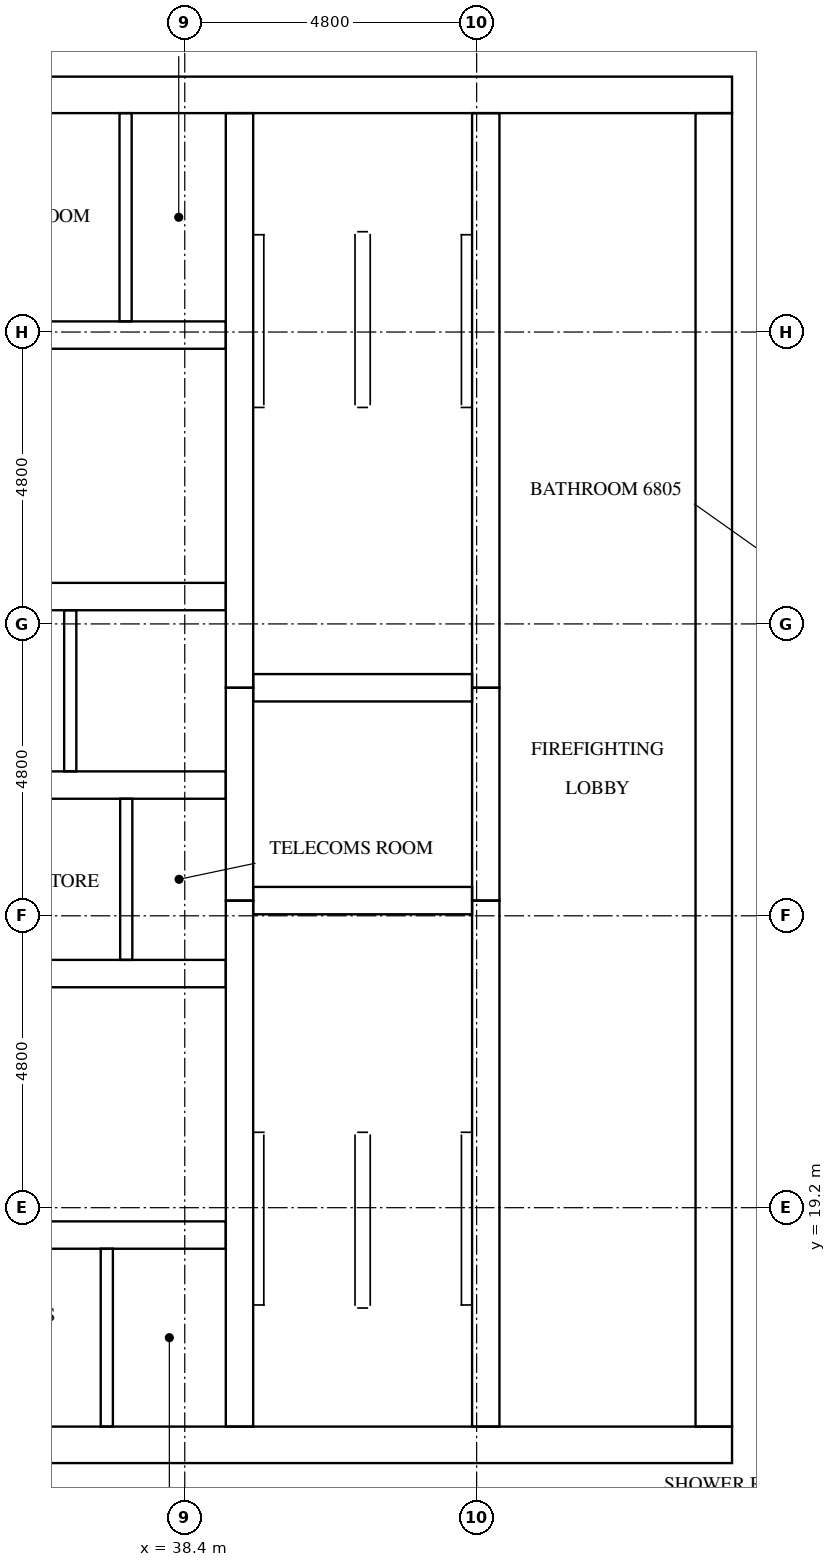
"""IFC4 building model, lengths in metres.
Left out: names, types, materials, properties, quantities, classifications, styles, units other than length and angle.
Written with IfcOpenShell. Run it as: python <this file> out.ifc"""

import sys

from ifc_helpers import new_model, si_unit, direction, frame, frame_2d, origin, place, context, subcontext, project, spatial, rectangle, extrude, element, fill, save


model = new_model("IFC4")
c1 = context("Model", 3, precision=1e-05, world=origin(), true_north=direction((0.0, 1.0)))
c2 = subcontext(c1, "Body", "Model", "MODEL_VIEW")
j1 = project(units=[si_unit("LENGTHUNIT", "METRE"), si_unit("PLANEANGLEUNIT", "RADIAN")], contexts=[c1])
p1 = place(None, origin())
s1 = spatial("IfcSite", under=j1, at=p1, CompositionType="ELEMENT")
p2 = place(p1, origin())
s2 = spatial("IfcBuilding", under=s1, at=p2, CompositionType="ELEMENT")
p3 = place(p2, frame((0.0, 0.0, 259.7)))
s3 = spatial("IfcBuildingStorey", under=s2, at=p3, CompositionType="ELEMENT", Elevation=259.7)
p4 = place(p3, frame((15.0, 15.3, 0.0), z_axis=(0.0, 0.0, 1.0), x_axis=(1.0, 0.0, 0.0)))
e1 = element("IfcWall", 1, at=p4, inside=s3, PredefinedType="SHEAR", context=c2, shape_type="SweptSolid", body=[
    extrude(rectangle(XDim=32.4, YDim=0.6, at=frame_2d((16.2, 0.0))), origin(), (0.0, 0.0, 1.0), 3.1),
])
p5 = place(p4, frame((15.3, 0.0, 0.0)))
e2 = element("IfcOpeningElement", 2, at=p5, cuts=e1, PredefinedType="OPENING", context=c2, shape_type="SweptSolid", body=[
    extrude(rectangle(XDim=1.8, YDim=2.1, at=frame_2d((0.9, 1.05))), frame((0.0, 0.31, 0.0), z_axis=(0.0, -1.0, 0.0), x_axis=(1.0, 0.0, 0.0)), (0.0, 0.0, 1.0), 0.62),
])
p6 = place(p3, frame((15.0, 37.5, 0.0), z_axis=(0.0, 0.0, 1.0), x_axis=(1.0, 0.0, 0.0)))
e3 = element("IfcWall", 3, at=p6, inside=s3, PredefinedType="SHEAR", context=c2, shape_type="SweptSolid", body=[
    extrude(rectangle(XDim=32.4, YDim=0.6, at=frame_2d((16.2, 0.0))), origin(), (0.0, 0.0, 1.0), 3.1),
])
p7 = place(p6, frame((15.3, 0.0, 0.0)))
e4 = element("IfcOpeningElement", 4, at=p7, cuts=e3, PredefinedType="OPENING", context=c2, shape_type="SweptSolid", body=[
    extrude(rectangle(XDim=1.8, YDim=2.1, at=frame_2d((0.9, 1.05))), frame((0.0, 0.31, 0.0), z_axis=(0.0, -1.0, 0.0), x_axis=(1.0, 0.0, 0.0)), (0.0, 0.0, 1.0), 0.62),
])
p8 = place(p6, frame((1.25, 0.0, 0.0)))
e5 = element("IfcOpeningElement", 5, at=p8, cuts=e3, PredefinedType="OPENING", context=c2, shape_type="SweptSolid", body=[
    extrude(rectangle(XDim=1.0, YDim=2.1, at=frame_2d((0.5, 1.05))), frame((0.0, 0.31, 0.0), z_axis=(0.0, -1.0, 0.0), x_axis=(1.0, 0.0, 0.0)), (0.0, 0.0, 1.0), 0.62),
])
p9 = place(p6, frame((4.988, 0.0, 0.0)))
e6 = element("IfcOpeningElement", 6, at=p9, cuts=e3, PredefinedType="OPENING", context=c2, shape_type="SweptSolid", body=[
    extrude(rectangle(XDim=1.0, YDim=2.1, at=frame_2d((0.5, 1.05))), frame((0.0, 0.31, 0.0), z_axis=(0.0, -1.0, 0.0), x_axis=(1.0, 0.0, 0.0)), (0.0, 0.0, 1.0), 0.62),
])
p10 = place(p3, frame((47.1, 15.6, 0.0), z_axis=(0.0, 0.0, 1.0), x_axis=(0.0, 1.0, 0.0)))
e7 = element("IfcWall", 7, at=p10, inside=s3, PredefinedType="SHEAR", context=c2, shape_type="SweptSolid", body=[
    extrude(rectangle(XDim=21.6, YDim=0.6, at=frame_2d((10.8, 0.0))), origin(), (0.0, 0.0, 1.0), 3.1),
])
p11 = place(p10, frame((10.5, 0.0, 0.0)))
e8 = element("IfcOpeningElement", 8, at=p11, cuts=e7, PredefinedType="OPENING", context=c2, shape_type="SweptSolid", body=[
    extrude(rectangle(XDim=1.2, YDim=2.1, at=frame_2d((0.6, 1.05))), frame((0.0, 0.31, 0.0), z_axis=(0.0, -1.0, 0.0), x_axis=(1.0, 0.0, 0.0)), (0.0, 0.0, 1.0), 0.62),
])
p12 = place(p3, frame((39.3, 15.6, 0.0), z_axis=(0.0, 0.0, 1.0), x_axis=(0.0, 1.0, 0.0)))
e9 = element("IfcWall", 9, at=p12, inside=s3, PredefinedType="SHEAR", context=c2, shape_type="SweptSolid", body=[
    extrude(rectangle(XDim=8.65, YDim=0.45, at=frame_2d((4.325, 0.0))), origin(), (0.0, 0.0, 1.0), 3.1),
])
p13 = place(p3, frame((39.3, 24.25, 0.0), z_axis=(0.0, 0.0, 1.0), x_axis=(0.0, 1.0, 0.0)))
e10 = element("IfcWall", 10, at=p13, inside=s3, PredefinedType="SHEAR", context=c2, shape_type="SweptSolid", body=[
    extrude(rectangle(XDim=3.5, YDim=0.45, at=frame_2d((1.75, 0.0))), origin(), (0.0, 0.0, 1.0), 3.1),
])
p14 = place(p3, frame((39.3, 27.75, 0.0), z_axis=(0.0, 0.0, 1.0), x_axis=(0.0, 1.0, 0.0)))
e11 = element("IfcWall", 11, at=p14, inside=s3, PredefinedType="SHEAR", context=c2, shape_type="SweptSolid", body=[
    extrude(rectangle(XDim=9.45, YDim=0.45, at=frame_2d((4.725, 0.0))), origin(), (0.0, 0.0, 1.0), 3.1),
])
p15 = place(p3, frame((43.35, 15.6, 0.0), z_axis=(0.0, 0.0, 1.0), x_axis=(0.0, 1.0, 0.0)))
e12 = element("IfcWall", 12, at=p15, inside=s3, PredefinedType="SHEAR", context=c2, shape_type="SweptSolid", body=[
    extrude(rectangle(XDim=8.65, YDim=0.45, at=frame_2d((4.325, 0.0))), origin(), (0.0, 0.0, 1.0), 3.1),
])
p16 = place(p15, frame((0.6, 0.0, 0.0)))
e13 = element("IfcOpeningElement", 13, at=p16, cuts=e12, PredefinedType="OPENING", context=c2, shape_type="SweptSolid", body=[
    extrude(rectangle(XDim=1.2, YDim=2.1, at=frame_2d((0.6, 1.05))), frame((0.0, 0.235, 0.0), z_axis=(0.0, -1.0, 0.0), x_axis=(1.0, 0.0, 0.0)), (0.0, 0.0, 1.0), 0.47),
])
p17 = place(p3, frame((43.35, 24.25, 0.0), z_axis=(0.0, 0.0, 1.0), x_axis=(0.0, 1.0, 0.0)))
e14 = element("IfcWall", 14, at=p17, inside=s3, PredefinedType="SHEAR", context=c2, shape_type="SweptSolid", body=[
    extrude(rectangle(XDim=3.5, YDim=0.45, at=frame_2d((1.75, 0.0))), origin(), (0.0, 0.0, 1.0), 3.1),
])
p18 = place(p17, frame((1.2, 0.0, 0.0)))
e15 = element("IfcOpeningElement", 15, at=p18, cuts=e14, PredefinedType="OPENING", context=c2, shape_type="SweptSolid", body=[
    extrude(rectangle(XDim=1.1, YDim=2.1, at=frame_2d((0.55, 1.05))), frame((0.0, 0.235, 0.0), z_axis=(0.0, -1.0, 0.0), x_axis=(1.0, 0.0, 0.0)), (0.0, 0.0, 1.0), 0.47),
])
p19 = place(p3, frame((43.35, 27.75, 0.0), z_axis=(0.0, 0.0, 1.0), x_axis=(0.0, 1.0, 0.0)))
e16 = element("IfcWall", 16, at=p19, inside=s3, PredefinedType="SHEAR", context=c2, shape_type="SweptSolid", body=[
    extrude(rectangle(XDim=9.45, YDim=0.45, at=frame_2d((4.725, 0.0))), origin(), (0.0, 0.0, 1.0), 3.1),
])
p20 = place(p19, frame((7.65, 0.0, 0.0)))
e17 = element("IfcOpeningElement", 17, at=p20, cuts=e16, PredefinedType="OPENING", context=c2, shape_type="SweptSolid", body=[
    extrude(rectangle(XDim=1.2, YDim=2.1, at=frame_2d((0.6, 1.05))), frame((0.0, 0.235, 0.0), z_axis=(0.0, -1.0, 0.0), x_axis=(1.0, 0.0, 0.0)), (0.0, 0.0, 1.0), 0.47),
])
for number, where, z_axis, x_axis in (
    (18, (39.525, 24.25, 0.0), (0.0, 0.0, 1.0), (1.0, 0.0, 0.0)),
    (19, (39.525, 27.75, 0.0), (0.0, 0.0, 1.0), (1.0, 0.0, 0.0)),
):
    element("IfcWall", number, at=place(p3, frame(where, z_axis=z_axis, x_axis=x_axis)), inside=s3, PredefinedType="SHEAR", context=c2, shape_type="SweptSolid", body=[
        extrude(rectangle(XDim=3.6, YDim=0.45, at=frame_2d((1.8, 0.0))), origin(), (0.0, 0.0, 1.0), 3.1),
    ])
p21 = place(p3, frame((33.475, 18.75, 0.0), z_axis=(0.0, 0.0, 1.0), x_axis=(1.0, 0.0, 0.0)))
e20 = element("IfcWall", 20, at=p21, inside=s3, PredefinedType="SHEAR", context=c2, shape_type="SweptSolid", body=[
    extrude(rectangle(XDim=5.6, YDim=0.45, at=frame_2d((2.8, 0.0))), origin(), (0.0, 0.0, 1.0), 3.1),
])
p22 = place(p21, frame((1.497, 0.0, 0.0)))
e21 = element("IfcOpeningElement", 21, at=p22, cuts=e20, PredefinedType="OPENING", context=c2, shape_type="SweptSolid", body=[
    extrude(rectangle(XDim=1.0, YDim=2.1, at=frame_2d((0.5, 1.05))), frame((0.0, 0.235, 0.0), z_axis=(0.0, -1.0, 0.0), x_axis=(1.0, 0.0, 0.0)), (0.0, 0.0, 1.0), 0.47),
])
p23 = place(p21, frame((4.171, 0.0, 0.0)))
e22 = element("IfcOpeningElement", 22, at=p23, cuts=e20, PredefinedType="OPENING", context=c2, shape_type="SweptSolid", body=[
    extrude(rectangle(XDim=1.0, YDim=2.1, at=frame_2d((0.5, 1.05))), frame((0.0, 0.235, 0.0), z_axis=(0.0, -1.0, 0.0), x_axis=(1.0, 0.0, 0.0)), (0.0, 0.0, 1.0), 0.47),
])
p24 = place(p3, frame((23.325, 23.05, 0.0), z_axis=(0.0, 0.0, 1.0), x_axis=(1.0, 0.0, 0.0)))
e23 = element("IfcWall", 23, at=p24, inside=s3, PredefinedType="SHEAR", context=c2, shape_type="SweptSolid", body=[
    extrude(rectangle(XDim=15.75, YDim=0.45, at=frame_2d((7.875, 0.0))), origin(), (0.0, 0.0, 1.0), 3.1),
])
p25 = place(p24, frame((2.058, 0.0, 0.0)))
e24 = element("IfcOpeningElement", 24, at=p25, cuts=e23, PredefinedType="OPENING", context=c2, shape_type="SweptSolid", body=[
    extrude(rectangle(XDim=1.0, YDim=2.1, at=frame_2d((0.5, 1.05))), frame((0.0, 0.235, 0.0), z_axis=(0.0, -1.0, 0.0), x_axis=(1.0, 0.0, 0.0)), (0.0, 0.0, 1.0), 0.47),
])
p26 = place(p24, frame((11.823, 0.0, 0.0)))
e25 = element("IfcOpeningElement", 25, at=p26, cuts=e23, PredefinedType="OPENING", context=c2, shape_type="SweptSolid", body=[
    extrude(rectangle(XDim=1.0, YDim=2.1, at=frame_2d((0.5, 1.05))), frame((0.0, 0.235, 0.0), z_axis=(0.0, -1.0, 0.0), x_axis=(1.0, 0.0, 0.0)), (0.0, 0.0, 1.0), 0.47),
])
p27 = place(p24, frame((14.481, 0.0, 0.0)))
e26 = element("IfcOpeningElement", 26, at=p27, cuts=e23, PredefinedType="OPENING", context=c2, shape_type="SweptSolid", body=[
    extrude(rectangle(XDim=1.0, YDim=2.1, at=frame_2d((0.5, 1.05))), frame((0.0, 0.235, 0.0), z_axis=(0.0, -1.0, 0.0), x_axis=(1.0, 0.0, 0.0)), (0.0, 0.0, 1.0), 0.47),
])
p28 = place(p3, frame((23.325, 26.15, 0.0), z_axis=(0.0, 0.0, 1.0), x_axis=(1.0, 0.0, 0.0)))
e27 = element("IfcWall", 27, at=p28, inside=s3, PredefinedType="SHEAR", context=c2, shape_type="SweptSolid", body=[
    extrude(rectangle(XDim=15.75, YDim=0.45, at=frame_2d((7.875, 0.0))), origin(), (0.0, 0.0, 1.0), 3.1),
])
p29 = place(p3, frame((23.325, 29.25, 0.0), z_axis=(0.0, 0.0, 1.0), x_axis=(1.0, 0.0, 0.0)))
e28 = element("IfcWall", 28, at=p29, inside=s3, PredefinedType="SHEAR", context=c2, shape_type="SweptSolid", body=[
    extrude(rectangle(XDim=15.75, YDim=0.45, at=frame_2d((7.875, 0.0))), origin(), (0.0, 0.0, 1.0), 3.1),
])
p30 = place(p29, frame((0.679, 0.0, 0.0)))
e29 = element("IfcOpeningElement", 29, at=p30, cuts=e28, PredefinedType="OPENING", context=c2, shape_type="SweptSolid", body=[
    extrude(rectangle(XDim=1.1, YDim=2.1, at=frame_2d((0.55, 1.05))), frame((0.0, 0.235, 0.0), z_axis=(0.0, -1.0, 0.0), x_axis=(1.0, 0.0, 0.0)), (0.0, 0.0, 1.0), 0.47),
])
p31 = place(p29, frame((3.337, 0.0, 0.0)))
e30 = element("IfcOpeningElement", 30, at=p31, cuts=e28, PredefinedType="OPENING", context=c2, shape_type="SweptSolid", body=[
    extrude(rectangle(XDim=1.1, YDim=2.1, at=frame_2d((0.55, 1.05))), frame((0.0, 0.235, 0.0), z_axis=(0.0, -1.0, 0.0), x_axis=(1.0, 0.0, 0.0)), (0.0, 0.0, 1.0), 0.47),
])
p32 = place(p29, frame((5.996, 0.0, 0.0)))
e31 = element("IfcOpeningElement", 31, at=p32, cuts=e28, PredefinedType="OPENING", context=c2, shape_type="SweptSolid", body=[
    extrude(rectangle(XDim=1.1, YDim=2.1, at=frame_2d((0.55, 1.05))), frame((0.0, 0.235, 0.0), z_axis=(0.0, -1.0, 0.0), x_axis=(1.0, 0.0, 0.0)), (0.0, 0.0, 1.0), 0.47),
])
p33 = place(p29, frame((8.654, 0.0, 0.0)))
e32 = element("IfcOpeningElement", 32, at=p33, cuts=e28, PredefinedType="OPENING", context=c2, shape_type="SweptSolid", body=[
    extrude(rectangle(XDim=1.1, YDim=2.1, at=frame_2d((0.55, 1.05))), frame((0.0, 0.235, 0.0), z_axis=(0.0, -1.0, 0.0), x_axis=(1.0, 0.0, 0.0)), (0.0, 0.0, 1.0), 0.47),
])
p34 = place(p29, frame((11.312, 0.0, 0.0)))
e33 = element("IfcOpeningElement", 33, at=p34, cuts=e28, PredefinedType="OPENING", context=c2, shape_type="SweptSolid", body=[
    extrude(rectangle(XDim=1.1, YDim=2.1, at=frame_2d((0.55, 1.05))), frame((0.0, 0.235, 0.0), z_axis=(0.0, -1.0, 0.0), x_axis=(1.0, 0.0, 0.0)), (0.0, 0.0, 1.0), 0.47),
])
p35 = place(p29, frame((13.971, 0.0, 0.0)))
e34 = element("IfcOpeningElement", 34, at=p35, cuts=e28, PredefinedType="OPENING", context=c2, shape_type="SweptSolid", body=[
    extrude(rectangle(XDim=1.1, YDim=2.1, at=frame_2d((0.55, 1.05))), frame((0.0, 0.235, 0.0), z_axis=(0.0, -1.0, 0.0), x_axis=(1.0, 0.0, 0.0)), (0.0, 0.0, 1.0), 0.47),
])
p36 = place(p3, frame((33.475, 33.55, 0.0), z_axis=(0.0, 0.0, 1.0), x_axis=(1.0, 0.0, 0.0)))
e35 = element("IfcWall", 35, at=p36, inside=s3, PredefinedType="SHEAR", context=c2, shape_type="SweptSolid", body=[
    extrude(rectangle(XDim=5.6, YDim=0.45, at=frame_2d((2.8, 0.0))), origin(), (0.0, 0.0, 1.0), 3.1),
])
p37 = place(p36, frame((1.651, 0.0, 0.0)))
e36 = element("IfcOpeningElement", 36, at=p37, cuts=e35, PredefinedType="OPENING", context=c2, shape_type="SweptSolid", body=[
    extrude(rectangle(XDim=1.0, YDim=2.1, at=frame_2d((0.5, 1.05))), frame((0.0, 0.235, 0.0), z_axis=(0.0, -1.0, 0.0), x_axis=(1.0, 0.0, 0.0)), (0.0, 0.0, 1.0), 0.47),
])
p38 = place(p36, frame((4.326, 0.0, 0.0)))
e37 = element("IfcOpeningElement", 37, at=p38, cuts=e35, PredefinedType="OPENING", context=c2, shape_type="SweptSolid", body=[
    extrude(rectangle(XDim=1.0, YDim=2.1, at=frame_2d((0.5, 1.05))), frame((0.0, 0.235, 0.0), z_axis=(0.0, -1.0, 0.0), x_axis=(1.0, 0.0, 0.0)), (0.0, 0.0, 1.0), 0.47),
])
p39 = place(p3, frame((36.517, 26.375, 0.0), z_axis=(0.0, 0.0, 1.0), x_axis=(0.0, 1.0, 0.0)))
e38 = element("IfcWall", 38, at=p39, inside=s3, PredefinedType="SOLIDWALL", context=c2, shape_type="SweptSolid", body=[
    extrude(rectangle(XDim=2.65, YDim=0.2, at=frame_2d((1.325, 0.0))), origin(), (0.0, 0.0, 1.0), 3.1),
])
p40 = place(p3, frame((37.438, 23.275, 0.0), z_axis=(0.0, 0.0, 1.0), x_axis=(0.0, 1.0, 0.0)))
e39 = element("IfcWall", 39, at=p40, inside=s3, PredefinedType="PARTITIONING", context=c2, shape_type="SweptSolid", body=[
    extrude(rectangle(XDim=2.65, YDim=0.2, at=frame_2d((1.325, 0.0))), origin(), (0.0, 0.0, 1.0), 3.1),
])
p41 = place(p3, frame((37.118, 15.6, 0.0), z_axis=(0.0, 0.0, 1.0), x_axis=(0.0, 1.0, 0.0)))
e40 = element("IfcWall", 40, at=p41, inside=s3, PredefinedType="PARTITIONING", context=c2, shape_type="SweptSolid", body=[
    extrude(rectangle(XDim=2.925, YDim=0.2, at=frame_2d((1.462, 0.0))), origin(), (0.0, 0.0, 1.0), 3.1),
])
p42 = place(p3, frame((37.427, 33.775, 0.0), z_axis=(0.0, 0.0, 1.0), x_axis=(0.0, 1.0, 0.0)))
e41 = element("IfcWall", 41, at=p42, inside=s3, PredefinedType="PARTITIONING", context=c2, shape_type="SweptSolid", body=[
    extrude(rectangle(XDim=3.425, YDim=0.2, at=frame_2d((1.712, 0.0))), origin(), (0.0, 0.0, 1.0), 3.1),
])
p43 = place(p35, origin())
e42 = element("IfcDoor", 42, at=p43, inside=s3, OperationType="DOUBLE_DOOR_SLIDING", PredefinedType="DOOR", context=c2, shape_type="SweptSolid", body=[
    extrude(rectangle(XDim=1.1, YDim=2.1, at=frame_2d((0.55, 1.05))), frame((0.0, 0.025, 0.0), z_axis=(0.0, -1.0, 0.0), x_axis=(1.0, 0.0, 0.0)), (0.0, 0.0, 1.0), 0.05),
])
fill(e34, e42)
p44 = place(p18, origin())
e43 = element("IfcDoor", 43, at=p44, inside=s3, OperationType="DOUBLE_DOOR_SLIDING", PredefinedType="DOOR", context=c2, shape_type="SweptSolid", body=[
    extrude(rectangle(XDim=1.1, YDim=2.1, at=frame_2d((0.55, 1.05))), frame((0.0, 0.025, 0.0), z_axis=(0.0, -1.0, 0.0), x_axis=(1.0, 0.0, 0.0)), (0.0, 0.0, 1.0), 0.05),
])
fill(e15, e43)
p45 = place(p16, origin())
e44 = element("IfcDoor", 44, at=p45, inside=s3, OperationType="SINGLE_SWING_LEFT", PredefinedType="DOOR", context=c2, shape_type="SweptSolid", body=[
    extrude(rectangle(XDim=1.2, YDim=2.1, at=frame_2d((0.6, 1.05))), frame((0.0, 0.025, 0.0), z_axis=(0.0, -1.0, 0.0), x_axis=(1.0, 0.0, 0.0)), (0.0, 0.0, 1.0), 0.05),
])
fill(e13, e44)
p46 = place(p20, origin())
e45 = element("IfcDoor", 45, at=p46, inside=s3, OperationType="SINGLE_SWING_RIGHT", PredefinedType="DOOR", context=c2, shape_type="SweptSolid", body=[
    extrude(rectangle(XDim=1.2, YDim=2.1, at=frame_2d((0.6, 1.05))), frame((0.0, 0.025, 0.0), z_axis=(0.0, -1.0, 0.0), x_axis=(1.0, 0.0, 0.0)), (0.0, 0.0, 1.0), 0.05),
])
fill(e17, e45)
p47 = place(p11, origin())
e46 = element("IfcDoor", 46, at=p47, inside=s3, OperationType="SINGLE_SWING_RIGHT", PredefinedType="DOOR", context=c2, shape_type="SweptSolid", body=[
    extrude(rectangle(XDim=1.2, YDim=2.1, at=frame_2d((0.6, 1.05))), frame((0.0, 0.025, 0.0), z_axis=(0.0, -1.0, 0.0), x_axis=(1.0, 0.0, 0.0)), (0.0, 0.0, 1.0), 0.05),
])
fill(e8, e46)
p48 = place(p27, frame((1.0, 0.0, 0.0), z_axis=(0.0, 0.0, 1.0), x_axis=(-1.0, 0.0, 0.0)))
e47 = element("IfcDoor", 47, at=p48, inside=s3, OperationType="SINGLE_SWING_LEFT", PredefinedType="DOOR", context=c2, shape_type="SweptSolid", body=[
    extrude(rectangle(XDim=1.0, YDim=2.1, at=frame_2d((0.5, 1.05))), frame((0.0, 0.025, 0.0), z_axis=(0.0, -1.0, 0.0), x_axis=(1.0, 0.0, 0.0)), (0.0, 0.0, 1.0), 0.05),
])
fill(e26, e47)
p49 = place(p23, origin())
e48 = element("IfcDoor", 48, at=p49, inside=s3, OperationType="SINGLE_SWING_LEFT", PredefinedType="DOOR", context=c2, shape_type="SweptSolid", body=[
    extrude(rectangle(XDim=1.0, YDim=2.1, at=frame_2d((0.5, 1.05))), frame((0.0, 0.025, 0.0), z_axis=(0.0, -1.0, 0.0), x_axis=(1.0, 0.0, 0.0)), (0.0, 0.0, 1.0), 0.05),
])
fill(e22, e48)
p50 = place(p38, frame((1.0, 0.0, 0.0), z_axis=(0.0, 0.0, 1.0), x_axis=(-1.0, 0.0, 0.0)))
e49 = element("IfcDoor", 49, at=p50, inside=s3, OperationType="SINGLE_SWING_LEFT", PredefinedType="DOOR", context=c2, shape_type="SweptSolid", body=[
    extrude(rectangle(XDim=1.0, YDim=2.1, at=frame_2d((0.5, 1.05))), frame((0.0, 0.025, 0.0), z_axis=(0.0, -1.0, 0.0), x_axis=(1.0, 0.0, 0.0)), (0.0, 0.0, 1.0), 0.05),
])
fill(e37, e49)
save(model, sys.argv[1])
